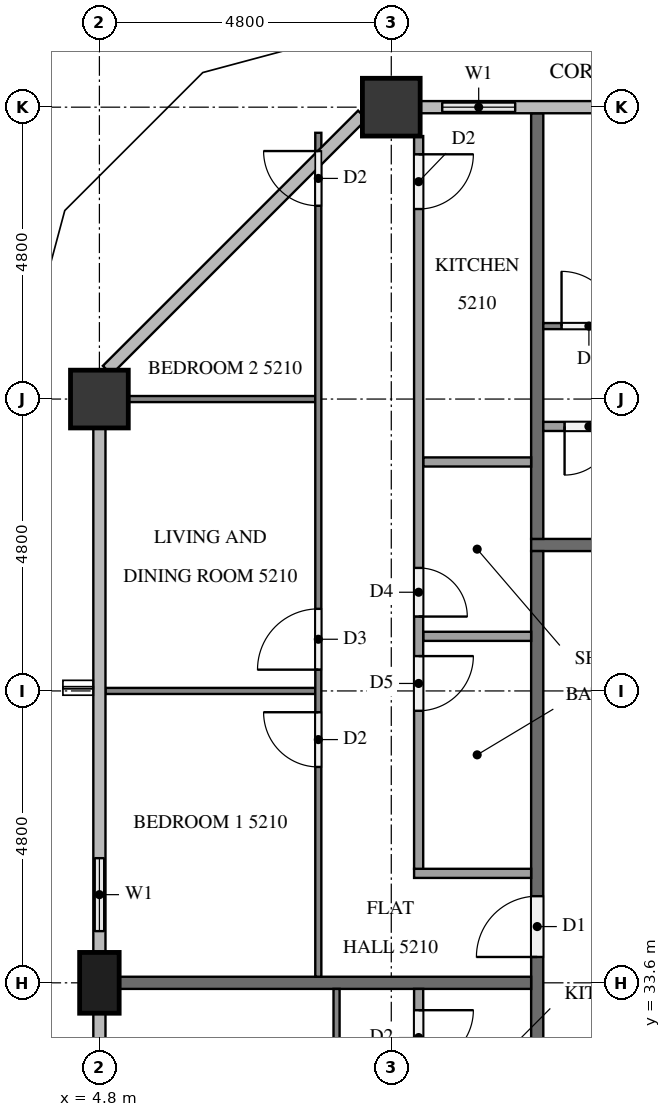
"""IFC4 building model, lengths in metres.
Left out: names, types, materials, properties, quantities, classifications, styles, units other than length and angle.
Written with IfcOpenShell. Run it as: python <this file> out.ifc"""

import sys

from ifc_helpers import new_model, si_unit, direction, frame, frame_2d, origin, origin_2d, place, context, subcontext, project, spatial, rectangle, extrude, element, fill, save


model = new_model("IFC4")
c1 = context("Model", 3, precision=1e-05, world=origin(), true_north=direction((0.0, 1.0)))
c2 = subcontext(c1, "Body", "Model", "MODEL_VIEW")
j1 = project(units=[si_unit("LENGTHUNIT", "METRE"), si_unit("PLANEANGLEUNIT", "RADIAN")], contexts=[c1])
p1 = place(None, origin())
s1 = spatial("IfcSite", under=j1, at=p1, CompositionType="ELEMENT")
p2 = place(p1, origin())
s2 = spatial("IfcBuilding", under=s1, at=p2, CompositionType="ELEMENT")
p3 = place(p2, frame((0.0, 0.0, 199.9)))
s3 = spatial("IfcBuildingStorey", under=s2, at=p3, CompositionType="ELEMENT", Elevation=199.9)
for number, where, z_axis, x_axis in (
    (1, (9.6, 48.0, 0.0), (0.0, 0.0, 1.0), (1.0, 0.0, 0.0)),
    (2, (4.8, 43.2, 0.0), (0.0, 0.0, 1.0), (1.0, 0.0, 0.0)),
):
    element("IfcColumn", number, at=place(p3, frame(where, z_axis=z_axis, x_axis=x_axis)), inside=s3, PredefinedType="COLUMN", context=c2, shape_type="SweptSolid", body=[
        extrude(rectangle(XDim=0.95, YDim=0.95, at=origin_2d()), origin(), (0.0, 0.0, 1.0), 3.1),
    ])
p4 = place(p3, frame((4.8, 33.6, 0.0), z_axis=(0.0, 0.0, 1.0), x_axis=(0.0, 1.0, 0.0)))
e3 = element("IfcColumn", 3, at=p4, inside=s3, PredefinedType="COLUMN", context=c2, shape_type="SweptSolid", body=[
    extrude(rectangle(XDim=1.0, YDim=0.65, at=origin_2d()), origin(), (0.0, 0.0, 1.0), 3.1),
])
p5 = place(p3, frame((12.0, 48.0, 0.0), z_axis=(0.0, 0.0, 1.0), x_axis=(-1.0, 0.0, 0.0)))
e4 = element("IfcWall", 4, at=p5, inside=s3, PredefinedType="SOLIDWALL", context=c2, shape_type="SweptSolid", body=[
    extrude(rectangle(XDim=1.925, YDim=0.15, at=frame_2d((0.962, 0.0))), origin(), (0.0, 0.0, 1.0), 3.1),
])
p6 = place(p5, frame((0.363, 0.0, 0.9)))
e5 = element("IfcOpeningElement", 5, at=p6, cuts=e4, PredefinedType="OPENING", context=c2, shape_type="SweptSolid", body=[
    extrude(rectangle(XDim=1.2, YDim=1.4, at=frame_2d((0.6, 0.7))), frame((0.0, 0.085, 0.0), z_axis=(0.0, -1.0, 0.0), x_axis=(1.0, 0.0, 0.0)), (0.0, 0.0, 1.0), 0.17),
])
p7 = place(p3, frame((4.8, 36.0, 0.0), z_axis=(0.0, 0.0, 1.0), x_axis=(0.0, -1.0, 0.0)))
e6 = element("IfcWall", 6, at=p7, inside=s3, PredefinedType="SOLIDWALL", context=c2, shape_type="SweptSolid", body=[
    extrude(rectangle(XDim=1.9, YDim=0.15, at=frame_2d((0.95, 0.0))), origin(), (0.0, 0.0, 1.0), 3.1),
])
p8 = place(p7, frame((0.35, 0.0, 0.9)))
e7 = element("IfcOpeningElement", 7, at=p8, cuts=e6, PredefinedType="OPENING", context=c2, shape_type="SweptSolid", body=[
    extrude(rectangle(XDim=1.2, YDim=1.4, at=frame_2d((0.6, 0.7))), frame((0.0, 0.085, 0.0), z_axis=(0.0, -1.0, 0.0), x_axis=(1.0, 0.0, 0.0)), (0.0, 0.0, 1.0), 0.17),
])
p9 = place(p3, frame((11.9, 40.8, 0.0), z_axis=(0.0, 0.0, 1.0), x_axis=(1.0, 0.0, 0.0)))
e8 = element("IfcWall", 8, at=p9, inside=s3, PredefinedType="PARTITIONING", context=c2, shape_type="SweptSolid", body=[
    extrude(rectangle(XDim=38.6, YDim=0.2, at=frame_2d((19.3, 0.0))), origin(), (0.0, 0.0, 1.0), 3.1),
])
p10 = place(p9, frame((37.025, 0.0, 0.0)))
e9 = element("IfcOpeningElement", 9, at=p10, cuts=e8, PredefinedType="OPENING", context=c2, shape_type="SweptSolid", body=[
    extrude(rectangle(XDim=1.1, YDim=2.1, at=frame_2d((0.55, 1.05))), frame((0.0, 0.11, 0.0), z_axis=(0.0, -1.0, 0.0), x_axis=(1.0, 0.0, 0.0)), (0.0, 0.0, 1.0), 0.22),
])
p11 = place(p9, frame((17.825, 0.0, 0.0)))
e10 = element("IfcOpeningElement", 10, at=p11, cuts=e8, PredefinedType="OPENING", context=c2, shape_type="SweptSolid", body=[
    extrude(rectangle(XDim=1.1, YDim=2.1, at=frame_2d((0.55, 1.05))), frame((0.0, 0.11, 0.0), z_axis=(0.0, -1.0, 0.0), x_axis=(1.0, 0.0, 0.0)), (0.0, 0.0, 1.0), 0.22),
])
p12 = place(p3, frame((12.0, 12.1, 0.0), z_axis=(0.0, 0.0, 1.0), x_axis=(0.0, 1.0, 0.0)))
e11 = element("IfcWall", 11, at=p12, inside=s3, PredefinedType="PARTITIONING", context=c2, shape_type="SweptSolid", body=[
    extrude(rectangle(XDim=28.6, YDim=0.2, at=frame_2d((14.3, 0.0))), origin(), (0.0, 0.0, 1.0), 3.1),
])
p13 = place(p12, frame((21.925, 0.0, 0.0)))
e12 = element("IfcOpeningElement", 12, at=p13, cuts=e11, PredefinedType="OPENING", context=c2, shape_type="SweptSolid", body=[
    extrude(rectangle(XDim=1.0, YDim=2.1, at=frame_2d((0.5, 1.05))), frame((0.0, 0.11, 0.0), z_axis=(0.0, -1.0, 0.0), x_axis=(1.0, 0.0, 0.0)), (0.0, 0.0, 1.0), 0.22),
])
p14 = place(p12, frame((14.725, 0.0, 0.0)))
e13 = element("IfcOpeningElement", 13, at=p14, cuts=e11, PredefinedType="OPENING", context=c2, shape_type="SweptSolid", body=[
    extrude(rectangle(XDim=1.0, YDim=2.1, at=frame_2d((0.5, 1.05))), frame((0.0, 0.11, 0.0), z_axis=(0.0, -1.0, 0.0), x_axis=(1.0, 0.0, 0.0)), (0.0, 0.0, 1.0), 0.22),
])
p15 = place(p12, frame((12.875, 0.0, 0.0)))
e14 = element("IfcOpeningElement", 14, at=p15, cuts=e11, PredefinedType="OPENING", context=c2, shape_type="SweptSolid", body=[
    extrude(rectangle(XDim=1.0, YDim=2.1, at=frame_2d((0.5, 1.05))), frame((0.0, 0.11, 0.0), z_axis=(0.0, -1.0, 0.0), x_axis=(1.0, 0.0, 0.0)), (0.0, 0.0, 1.0), 0.22),
])
p16 = place(p3, frame((12.0, 47.9, 0.0), z_axis=(0.0, 0.0, 1.0), x_axis=(0.0, -1.0, 0.0)))
e15 = element("IfcWall", 15, at=p16, inside=s3, PredefinedType="PARTITIONING", context=c2, shape_type="SweptSolid", body=[
    extrude(rectangle(XDim=7.0, YDim=0.2, at=frame_2d((3.5, 0.0))), origin(), (0.0, 0.0, 1.0), 3.1),
])
p17 = place(p3, frame((5.125, 33.6, 0.0), z_axis=(0.0, 0.0, 1.0), x_axis=(1.0, 0.0, 0.0)))
e16 = element("IfcWall", 16, at=p17, inside=s3, PredefinedType="PARTITIONING", context=c2, shape_type="SweptSolid", body=[
    extrude(rectangle(XDim=6.775, YDim=0.2, at=frame_2d((3.387, 0.0))), origin(), (0.0, 0.0, 1.0), 3.1),
])
p18 = place(p3, frame((12.1, 44.4, 0.0), z_axis=(0.0, 0.0, 1.0), x_axis=(1.0, 0.0, 0.0)))
e17 = element("IfcWall", 17, at=p18, inside=s3, PredefinedType="PARTITIONING", context=c2, shape_type="SweptSolid", body=[
    extrude(rectangle(XDim=19.0, YDim=0.1, at=frame_2d((9.5, 0.0))), origin(), (0.0, 0.0, 1.0), 3.1),
])
p19 = place(p18, frame((17.7, 0.0, 0.0)))
e18 = element("IfcOpeningElement", 18, at=p19, cuts=e17, PredefinedType="OPENING", context=c2, shape_type="SweptSolid", body=[
    extrude(rectangle(XDim=1.0, YDim=2.1, at=frame_2d((0.5, 1.05))), frame((0.0, 0.06, 0.0), z_axis=(0.0, -1.0, 0.0), x_axis=(1.0, 0.0, 0.0)), (0.0, 0.0, 1.0), 0.12),
])
p20 = place(p18, frame((9.85, 0.0, 0.0)))
e19 = element("IfcOpeningElement", 19, at=p20, cuts=e17, PredefinedType="OPENING", context=c2, shape_type="SweptSolid", body=[
    extrude(rectangle(XDim=0.9, YDim=2.1, at=frame_2d((0.45, 1.05))), frame((0.0, 0.06, 0.0), z_axis=(0.0, -1.0, 0.0), x_axis=(1.0, 0.0, 0.0)), (0.0, 0.0, 1.0), 0.12),
])
p21 = place(p18, frame((8.25, 0.0, 0.0)))
e20 = element("IfcOpeningElement", 20, at=p21, cuts=e17, PredefinedType="OPENING", context=c2, shape_type="SweptSolid", body=[
    extrude(rectangle(XDim=0.9, YDim=2.1, at=frame_2d((0.45, 1.05))), frame((0.0, 0.06, 0.0), z_axis=(0.0, -1.0, 0.0), x_axis=(1.0, 0.0, 0.0)), (0.0, 0.0, 1.0), 0.12),
])
p22 = place(p18, frame((0.3, 0.0, 0.0)))
e21 = element("IfcOpeningElement", 21, at=p22, cuts=e17, PredefinedType="OPENING", context=c2, shape_type="SweptSolid", body=[
    extrude(rectangle(XDim=0.9, YDim=2.1, at=frame_2d((0.45, 1.05))), frame((0.0, 0.06, 0.0), z_axis=(0.0, -1.0, 0.0), x_axis=(1.0, 0.0, 0.0)), (0.0, 0.0, 1.0), 0.12),
])
p23 = place(p3, frame((29.325, 42.75, 0.0), z_axis=(0.0, 0.0, 1.0), x_axis=(-1.0, 0.0, 0.0)))
e22 = element("IfcWall", 22, at=p23, inside=s3, PredefinedType="PARTITIONING", context=c2, shape_type="SweptSolid", body=[
    extrude(rectangle(XDim=17.225, YDim=0.15, at=frame_2d((8.612, 0.0))), origin(), (0.0, 0.0, 1.0), 3.1),
])
p24 = place(p23, frame((0.3, 0.0, 0.0)))
e23 = element("IfcOpeningElement", 23, at=p24, cuts=e22, PredefinedType="OPENING", context=c2, shape_type="SweptSolid", body=[
    extrude(rectangle(XDim=0.9, YDim=2.1, at=frame_2d((0.45, 1.05))), frame((0.0, 0.085, 0.0), z_axis=(0.0, -1.0, 0.0), x_axis=(1.0, 0.0, 0.0)), (0.0, 0.0, 1.0), 0.17),
])
p25 = place(p23, frame((9.541, 0.0, 0.0)))
e24 = element("IfcOpeningElement", 24, at=p25, cuts=e22, PredefinedType="OPENING", context=c2, shape_type="SweptSolid", body=[
    extrude(rectangle(XDim=0.9, YDim=2.1, at=frame_2d((0.45, 1.05))), frame((0.0, 0.085, 0.0), z_axis=(0.0, -1.0, 0.0), x_axis=(1.0, 0.0, 0.0)), (0.0, 0.0, 1.0), 0.17),
])
p26 = place(p23, frame((11.091, 0.0, 0.0)))
e25 = element("IfcOpeningElement", 25, at=p26, cuts=e22, PredefinedType="OPENING", context=c2, shape_type="SweptSolid", body=[
    extrude(rectangle(XDim=0.8, YDim=2.1, at=frame_2d((0.4, 1.05))), frame((0.0, 0.085, 0.0), z_axis=(0.0, -1.0, 0.0), x_axis=(1.0, 0.0, 0.0)), (0.0, 0.0, 1.0), 0.17),
])
p27 = place(p23, frame((16.075, 0.0, 0.0)))
e26 = element("IfcOpeningElement", 26, at=p27, cuts=e22, PredefinedType="OPENING", context=c2, shape_type="SweptSolid", body=[
    extrude(rectangle(XDim=0.8, YDim=2.1, at=frame_2d((0.4, 1.05))), frame((0.0, 0.085, 0.0), z_axis=(0.0, -1.0, 0.0), x_axis=(1.0, 0.0, 0.0)), (0.0, 0.0, 1.0), 0.17),
])
p28 = place(p3, frame((8.35, 38.4, 0.0), z_axis=(0.0, 0.0, 1.0), x_axis=(-1.0, 0.0, 0.0)))
e27 = element("IfcWall", 27, at=p28, inside=s3, PredefinedType="PARTITIONING", context=c2, shape_type="SweptSolid", body=[
    extrude(rectangle(XDim=3.45, YDim=0.1, at=frame_2d((1.725, 0.0))), origin(), (0.0, 0.0, 1.0), 3.1),
])
p29 = place(p3, frame((8.35, 43.2, 0.0), z_axis=(0.0, 0.0, 1.0), x_axis=(-1.0, 0.0, 0.0)))
e28 = element("IfcWall", 28, at=p29, inside=s3, PredefinedType="PARTITIONING", context=c2, shape_type="SweptSolid", body=[
    extrude(rectangle(XDim=3.075, YDim=0.1, at=frame_2d((1.538, 0.0))), origin(), (0.0, 0.0, 1.0), 3.1),
])
p30 = place(p3, frame((8.4, 33.7, 0.0), z_axis=(0.0, 0.0, 1.0), x_axis=(0.0, 1.0, 0.0)))
e29 = element("IfcWall", 29, at=p30, inside=s3, PredefinedType="PARTITIONING", context=c2, shape_type="SweptSolid", body=[
    extrude(rectangle(XDim=13.879, YDim=0.1, at=frame_2d((6.939, 0.0))), origin(), (0.0, 0.0, 1.0), 3.1),
])
p31 = place(p30, frame((3.45, 0.0, 0.0)))
e30 = element("IfcOpeningElement", 30, at=p31, cuts=e29, PredefinedType="OPENING", context=c2, shape_type="SweptSolid", body=[
    extrude(rectangle(XDim=0.9, YDim=2.1, at=frame_2d((0.45, 1.05))), frame((0.0, 0.06, 0.0), z_axis=(0.0, -1.0, 0.0), x_axis=(1.0, 0.0, 0.0)), (0.0, 0.0, 1.0), 0.12),
])
p32 = place(p30, frame((5.05, 0.0, 0.0)))
e31 = element("IfcOpeningElement", 31, at=p32, cuts=e29, PredefinedType="OPENING", context=c2, shape_type="SweptSolid", body=[
    extrude(rectangle(XDim=1.0, YDim=2.1, at=frame_2d((0.5, 1.05))), frame((0.0, 0.06, 0.0), z_axis=(0.0, -1.0, 0.0), x_axis=(1.0, 0.0, 0.0)), (0.0, 0.0, 1.0), 0.12),
])
p33 = place(p30, frame((12.678, 0.0, 0.0)))
e32 = element("IfcOpeningElement", 32, at=p33, cuts=e29, PredefinedType="OPENING", context=c2, shape_type="SweptSolid", body=[
    extrude(rectangle(XDim=0.9, YDim=2.1, at=frame_2d((0.45, 1.05))), frame((0.0, 0.06, 0.0), z_axis=(0.0, -1.0, 0.0), x_axis=(1.0, 0.0, 0.0)), (0.0, 0.0, 1.0), 0.12),
])
for number, where, z_axis, x_axis in (
    (33, (11.9, 39.298, 0.0), (0.0, 0.0, 1.0), (-1.0, 0.0, 0.0)),
    (34, (11.9, 42.165, 0.0), (0.0, 0.0, 1.0), (-1.0, 0.0, 0.0)),
):
    element("IfcWall", number, at=place(p3, frame(where, z_axis=z_axis, x_axis=x_axis)), inside=s3, PredefinedType="PARTITIONING", context=c2, shape_type="SweptSolid", body=[
        extrude(rectangle(XDim=1.775, YDim=0.15, at=frame_2d((0.887, 0.0))), origin(), (0.0, 0.0, 1.0), 3.1),
    ])
p34 = place(p3, frame((11.9, 35.4, 0.0), z_axis=(0.0, 0.0, 1.0), x_axis=(-1.0, 0.0, 0.0)))
e35 = element("IfcWall", 35, at=p34, inside=s3, PredefinedType="PARTITIONING", context=c2, shape_type="SweptSolid", body=[
    extrude(rectangle(XDim=1.925, YDim=0.15, at=frame_2d((0.962, 0.0))), origin(), (0.0, 0.0, 1.0), 3.1),
])
p35 = place(p3, frame((10.05, 47.525, 0.0), z_axis=(0.0, 0.0, 1.0), x_axis=(0.0, -1.0, 0.0)))
e36 = element("IfcWall", 36, at=p35, inside=s3, PredefinedType="PARTITIONING", context=c2, shape_type="SweptSolid", body=[
    extrude(rectangle(XDim=12.05, YDim=0.15, at=frame_2d((6.025, 0.0))), origin(), (0.0, 0.0, 1.0), 3.1),
])
p36 = place(p35, frame((8.552, 0.0, 0.0)))
e37 = element("IfcOpeningElement", 37, at=p36, cuts=e36, PredefinedType="OPENING", context=c2, shape_type="SweptSolid", body=[
    extrude(rectangle(XDim=0.9, YDim=2.1, at=frame_2d((0.45, 1.05))), frame((0.0, 0.085, 0.0), z_axis=(0.0, -1.0, 0.0), x_axis=(1.0, 0.0, 0.0)), (0.0, 0.0, 1.0), 0.17),
])
p37 = place(p35, frame((7.102, 0.0, 0.0)))
e38 = element("IfcOpeningElement", 38, at=p37, cuts=e36, PredefinedType="OPENING", context=c2, shape_type="SweptSolid", body=[
    extrude(rectangle(XDim=0.8, YDim=2.1, at=frame_2d((0.4, 1.05))), frame((0.0, 0.085, 0.0), z_axis=(0.0, -1.0, 0.0), x_axis=(1.0, 0.0, 0.0)), (0.0, 0.0, 1.0), 0.17),
])
p38 = place(p35, frame((0.3, 0.0, 0.0)))
e39 = element("IfcOpeningElement", 39, at=p38, cuts=e36, PredefinedType="OPENING", context=c2, shape_type="SweptSolid", body=[
    extrude(rectangle(XDim=0.9, YDim=2.1, at=frame_2d((0.45, 1.05))), frame((0.0, 0.085, 0.0), z_axis=(0.0, -1.0, 0.0), x_axis=(1.0, 0.0, 0.0)), (0.0, 0.0, 1.0), 0.17),
])
p39 = place(p3, frame((8.7, 26.5, 0.0), z_axis=(0.0, 0.0, 1.0), x_axis=(0.0, 1.0, 0.0)))
e40 = element("IfcWall", 40, at=p39, inside=s3, PredefinedType="PARTITIONING", context=c2, shape_type="SweptSolid", body=[
    extrude(rectangle(XDim=7.0, YDim=0.1, at=frame_2d((3.5, 0.0))), origin(), (0.0, 0.0, 1.0), 3.1),
])
p40 = place(p39, frame((0.3, 0.0, 0.0)))
e41 = element("IfcOpeningElement", 41, at=p40, cuts=e40, PredefinedType="OPENING", context=c2, shape_type="SweptSolid", body=[
    extrude(rectangle(XDim=1.0, YDim=2.1, at=frame_2d((0.5, 1.05))), frame((0.0, 0.06, 0.0), z_axis=(0.0, -1.0, 0.0), x_axis=(1.0, 0.0, 0.0)), (0.0, 0.0, 1.0), 0.12),
])
p41 = place(p3, frame((10.05, 33.5, 0.0), z_axis=(0.0, 0.0, 1.0), x_axis=(0.0, -1.0, 0.0)))
e42 = element("IfcWall", 42, at=p41, inside=s3, PredefinedType="PARTITIONING", context=c2, shape_type="SweptSolid", body=[
    extrude(rectangle(XDim=5.225, YDim=0.15, at=frame_2d((2.613, 0.0))), origin(), (0.0, 0.0, 1.0), 3.1),
])
p42 = place(p41, frame((4.125, 0.0, 0.0)))
e43 = element("IfcOpeningElement", 43, at=p42, cuts=e42, PredefinedType="OPENING", context=c2, shape_type="SweptSolid", body=[
    extrude(rectangle(XDim=0.8, YDim=2.1, at=frame_2d((0.4, 1.05))), frame((0.0, 0.085, 0.0), z_axis=(0.0, -1.0, 0.0), x_axis=(1.0, 0.0, 0.0)), (0.0, 0.0, 1.0), 0.17),
])
p43 = place(p41, frame((0.35, 0.0, 0.0)))
e44 = element("IfcOpeningElement", 44, at=p43, cuts=e42, PredefinedType="OPENING", context=c2, shape_type="SweptSolid", body=[
    extrude(rectangle(XDim=0.9, YDim=2.1, at=frame_2d((0.45, 1.05))), frame((0.0, 0.085, 0.0), z_axis=(0.0, -1.0, 0.0), x_axis=(1.0, 0.0, 0.0)), (0.0, 0.0, 1.0), 0.17),
])
p44 = place(p6, origin())
e45 = element("IfcWindow", 45, at=p44, inside=s3, PartitioningType="SINGLE_PANEL", PredefinedType="WINDOW", context=c2, shape_type="SweptSolid", body=[
    extrude(rectangle(XDim=1.2, YDim=1.4, at=frame_2d((0.6, 0.7))), frame((0.0, 0.03, 0.0), z_axis=(0.0, -1.0, 0.0), x_axis=(1.0, 0.0, 0.0)), (0.0, 0.0, 1.0), 0.06),
])
fill(e5, e45)
p45 = place(p8, origin())
e46 = element("IfcWindow", 46, at=p45, inside=s3, PartitioningType="SINGLE_PANEL", PredefinedType="WINDOW", context=c2, shape_type="SweptSolid", body=[
    extrude(rectangle(XDim=1.2, YDim=1.4, at=frame_2d((0.6, 0.7))), frame((0.0, 0.03, 0.0), z_axis=(0.0, -1.0, 0.0), x_axis=(1.0, 0.0, 0.0)), (0.0, 0.0, 1.0), 0.06),
])
fill(e7, e46)
p46 = place(p13, origin())
e47 = element("IfcDoor", 47, at=p46, inside=s3, OperationType="SINGLE_SWING_LEFT", PredefinedType="DOOR", context=c2, shape_type="SweptSolid", body=[
    extrude(rectangle(XDim=1.0, YDim=2.1, at=frame_2d((0.5, 1.05))), frame((0.0, 0.025, 0.0), z_axis=(0.0, -1.0, 0.0), x_axis=(1.0, 0.0, 0.0)), (0.0, 0.0, 1.0), 0.05),
])
fill(e12, e47)
p47 = place(p22, origin())
e48 = element("IfcDoor", 48, at=p47, inside=s3, OperationType="SINGLE_SWING_LEFT", PredefinedType="DOOR", context=c2, shape_type="SweptSolid", body=[
    extrude(rectangle(XDim=0.9, YDim=2.1, at=frame_2d((0.45, 1.05))), frame((0.0, 0.025, 0.0), z_axis=(0.0, -1.0, 0.0), x_axis=(1.0, 0.0, 0.0)), (0.0, 0.0, 1.0), 0.05),
])
fill(e21, e48)
p48 = place(p27, origin())
e49 = element("IfcDoor", 49, at=p48, inside=s3, OperationType="SINGLE_SWING_RIGHT", PredefinedType="DOOR", context=c2, shape_type="SweptSolid", body=[
    extrude(rectangle(XDim=0.8, YDim=2.1, at=frame_2d((0.4, 1.05))), frame((0.0, 0.025, 0.0), z_axis=(0.0, -1.0, 0.0), x_axis=(1.0, 0.0, 0.0)), (0.0, 0.0, 1.0), 0.05),
])
fill(e26, e49)
p49 = place(p31, origin())
e50 = element("IfcDoor", 50, at=p49, inside=s3, OperationType="SINGLE_SWING_RIGHT", PredefinedType="DOOR", context=c2, shape_type="SweptSolid", body=[
    extrude(rectangle(XDim=0.9, YDim=2.1, at=frame_2d((0.45, 1.05))), frame((0.0, 0.025, 0.0), z_axis=(0.0, -1.0, 0.0), x_axis=(1.0, 0.0, 0.0)), (0.0, 0.0, 1.0), 0.05),
])
fill(e30, e50)
p50 = place(p32, origin())
e51 = element("IfcDoor", 51, at=p50, inside=s3, OperationType="SINGLE_SWING_LEFT", PredefinedType="DOOR", context=c2, shape_type="SweptSolid", body=[
    extrude(rectangle(XDim=1.0, YDim=2.1, at=frame_2d((0.5, 1.05))), frame((0.0, 0.025, 0.0), z_axis=(0.0, -1.0, 0.0), x_axis=(1.0, 0.0, 0.0)), (0.0, 0.0, 1.0), 0.05),
])
fill(e31, e51)
p51 = place(p33, origin())
e52 = element("IfcDoor", 52, at=p51, inside=s3, OperationType="SINGLE_SWING_RIGHT", PredefinedType="DOOR", context=c2, shape_type="SweptSolid", body=[
    extrude(rectangle(XDim=0.9, YDim=2.1, at=frame_2d((0.45, 1.05))), frame((0.0, 0.025, 0.0), z_axis=(0.0, -1.0, 0.0), x_axis=(1.0, 0.0, 0.0)), (0.0, 0.0, 1.0), 0.05),
])
fill(e32, e52)
p52 = place(p36, origin())
e53 = element("IfcDoor", 53, at=p52, inside=s3, OperationType="SINGLE_SWING_LEFT", PredefinedType="DOOR", context=c2, shape_type="SweptSolid", body=[
    extrude(rectangle(XDim=0.9, YDim=2.1, at=frame_2d((0.45, 1.05))), frame((0.0, 0.025, 0.0), z_axis=(0.0, -1.0, 0.0), x_axis=(1.0, 0.0, 0.0)), (0.0, 0.0, 1.0), 0.05),
])
fill(e37, e53)
p53 = place(p37, origin())
e54 = element("IfcDoor", 54, at=p53, inside=s3, OperationType="SINGLE_SWING_RIGHT", PredefinedType="DOOR", context=c2, shape_type="SweptSolid", body=[
    extrude(rectangle(XDim=0.8, YDim=2.1, at=frame_2d((0.4, 1.05))), frame((0.0, 0.025, 0.0), z_axis=(0.0, -1.0, 0.0), x_axis=(1.0, 0.0, 0.0)), (0.0, 0.0, 1.0), 0.05),
])
fill(e38, e54)
p54 = place(p38, origin())
e55 = element("IfcDoor", 55, at=p54, inside=s3, OperationType="SINGLE_SWING_LEFT", PredefinedType="DOOR", context=c2, shape_type="SweptSolid", body=[
    extrude(rectangle(XDim=0.9, YDim=2.1, at=frame_2d((0.45, 1.05))), frame((0.0, 0.025, 0.0), z_axis=(0.0, -1.0, 0.0), x_axis=(1.0, 0.0, 0.0)), (0.0, 0.0, 1.0), 0.05),
])
fill(e39, e55)
p55 = place(p43, origin())
e56 = element("IfcDoor", 56, at=p55, inside=s3, OperationType="SINGLE_SWING_LEFT", PredefinedType="DOOR", context=c2, shape_type="SweptSolid", body=[
    extrude(rectangle(XDim=0.9, YDim=2.1, at=frame_2d((0.45, 1.05))), frame((0.0, 0.025, 0.0), z_axis=(0.0, -1.0, 0.0), x_axis=(1.0, 0.0, 0.0)), (0.0, 0.0, 1.0), 0.05),
])
fill(e44, e56)
save(model, sys.argv[1])
